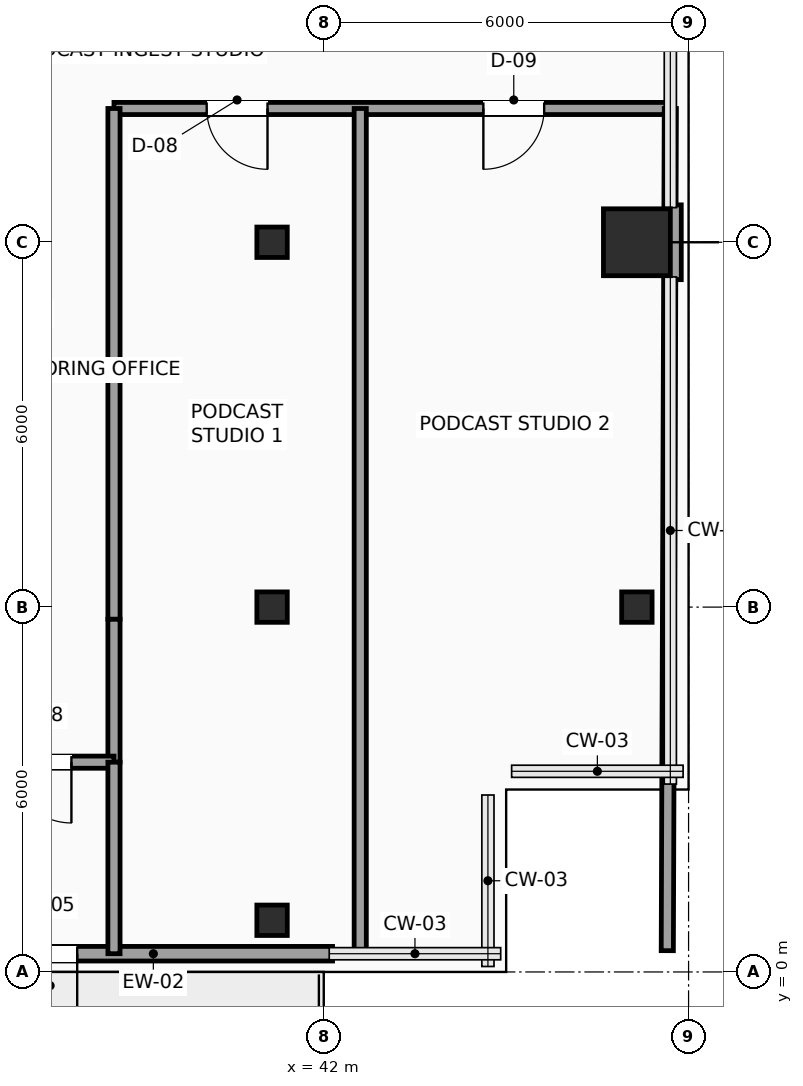
"""IFC4 building model, lengths in metres.
Left out: names, types, materials, properties, quantities, classifications, styles, units other than length and angle.
Written with IfcOpenShell. Run it as: python <this file> out.ifc"""

import sys

from ifc_helpers import new_model, si_unit, direction, frame, frame_2d, origin, origin_2d, place, context, subcontext, project, spatial, rectangle, hollow_rectangle, extrude, element, fill, save


model = new_model("IFC4")
c1 = context("Model", 3, precision=1e-05, world=origin(), true_north=direction((0.0, 1.0)))
c2 = subcontext(c1, "Body", "Model", "MODEL_VIEW")
j1 = project(units=[si_unit("LENGTHUNIT", "METRE"), si_unit("PLANEANGLEUNIT", "RADIAN")], contexts=[c1])
p1 = place(None, origin())
s1 = spatial("IfcSite", under=j1, at=p1, CompositionType="ELEMENT")
p2 = place(p1, origin())
s2 = spatial("IfcBuilding", under=s1, at=p2, CompositionType="ELEMENT")
p3 = place(p2, frame((0.0, 0.0, 123.15)))
s3 = spatial("IfcBuildingStorey", under=s2, at=p3, CompositionType="ELEMENT", Elevation=123.15)
for number, where, z_axis, x_axis in (
    (1, (41.15, 0.85, 0.0), (0.0, 0.0, 1.0), (1.0, 0.0, 0.0)),
    (2, (41.15, 6.0, 0.0), (0.0, 0.0, 1.0), (1.0, 0.0, 0.0)),
    (3, (41.15, 12.0, 0.0), (0.0, 0.0, 1.0), (1.0, 0.0, 0.0)),
    (4, (47.15, 6.0, 0.0), (0.0, 0.0, 1.0), (1.0, 0.0, 0.0)),
):
    element("IfcColumn", number, at=place(p3, frame(where, z_axis=z_axis, x_axis=x_axis)), inside=s3, PredefinedType="COLUMN", context=c2, shape_type="SweptSolid", body=[
        extrude(hollow_rectangle(XDim=0.5, YDim=0.5, WallThickness=0.025, InnerFilletRadius=0.025, OuterFilletRadius=0.04, at=origin_2d()), origin(), (0.0, 0.0, 1.0), 3.75),
    ])
p4 = place(p3, frame((47.15, 12.0, 0.0), z_axis=(0.0, 0.0, 1.0), x_axis=(1.0, 0.0, 0.0)))
e5 = element("IfcColumn", 5, at=p4, inside=s3, PredefinedType="COLUMN", context=c2, shape_type="SweptSolid", body=[
    extrude(rectangle(XDim=1.1, YDim=1.1, at=origin_2d()), origin(), (0.0, 0.0, 1.0), 3.75),
])
p5 = place(p3, frame((42.145, 0.3, 0.0), z_axis=(0.0, 0.0, 1.0), x_axis=(-1.0, 0.0, 0.0)))
e6 = element("IfcWall", 6, at=p5, inside=s3, PredefinedType="SOLIDWALL", context=c2, shape_type="SweptSolid", body=[
    extrude(rectangle(XDim=9.29, YDim=0.24, at=frame_2d((4.645, 0.0))), origin(), (0.0, 0.0, 1.0), 3.525),
])
p6 = place(p5, frame((4.2, 0.0, 0.0)))
e7 = element("IfcOpeningElement", 7, at=p6, cuts=e6, PredefinedType="OPENING", context=c2, shape_type="SweptSolid", body=[
    extrude(rectangle(XDim=1.05, YDim=2.2, at=frame_2d((0.525, 1.1))), frame((0.0, 0.13, 0.0), z_axis=(0.0, -1.0, 0.0), x_axis=(1.0, 0.0, 0.0)), (0.0, 0.0, 1.0), 0.26),
])
p7 = place(p3, frame((47.76, 12.615, 0.0), z_axis=(0.0, 0.0, 1.0), x_axis=(0.0, -1.0, 0.0)))
e8 = element("IfcWall", 8, at=p7, inside=s3, PredefinedType="SOLIDWALL", context=c2, shape_type="SweptSolid", body=[
    extrude(rectangle(XDim=1.23, YDim=0.24, at=frame_2d((0.615, 0.0))), origin(), (0.0, 0.0, 1.0), 3.525),
])
p8 = place(p3, frame((47.7, 14.2, 0.0), z_axis=(0.0, 0.0, 1.0), x_axis=(-1.0, 0.0, 0.0)))
e9 = element("IfcWall", 9, at=p8, inside=s3, PredefinedType="SOLIDWALL", context=c2, shape_type="SweptSolid", body=[
    extrude(rectangle(XDim=9.15, YDim=0.2, at=frame_2d((4.575, 0.0))), origin(), (0.0, 0.0, 1.0), 3.525),
])
p9 = place(p8, frame((6.625, 0.0, 0.0)))
e10 = element("IfcOpeningElement", 10, at=p9, cuts=e9, PredefinedType="OPENING", context=c2, shape_type="SweptSolid", body=[
    extrude(rectangle(XDim=1.0, YDim=2.2, at=frame_2d((0.5, 1.1))), frame((0.0, 0.11, 0.0), z_axis=(0.0, -1.0, 0.0), x_axis=(1.0, 0.0, 0.0)), (0.0, 0.0, 1.0), 0.22),
])
p10 = place(p8, frame((2.075, 0.0, 0.0)))
e11 = element("IfcOpeningElement", 11, at=p10, cuts=e9, PredefinedType="OPENING", context=c2, shape_type="SweptSolid", body=[
    extrude(rectangle(XDim=1.0, YDim=2.2, at=frame_2d((0.5, 1.1))), frame((0.0, 0.11, 0.0), z_axis=(0.0, -1.0, 0.0), x_axis=(1.0, 0.0, 0.0)), (0.0, 0.0, 1.0), 0.22),
])
p11 = place(p3, frame((38.55, 14.2, 0.0), z_axis=(0.0, 0.0, 1.0), x_axis=(0.0, -1.0, 0.0)))
e12 = element("IfcWall", 12, at=p11, inside=s3, PredefinedType="SOLIDWALL", context=c2, shape_type="SweptSolid", body=[
    extrude(rectangle(XDim=8.4, YDim=0.2, at=frame_2d((4.2, 0.0))), origin(), (0.0, 0.0, 1.0), 3.525),
])
p12 = place(p3, frame((38.55, 5.8, 0.0), z_axis=(0.0, 0.0, 1.0), x_axis=(0.0, -1.0, 0.0)))
e13 = element("IfcWall", 13, at=p12, inside=s3, PredefinedType="SOLIDWALL", context=c2, shape_type="SweptSolid", body=[
    extrude(rectangle(XDim=2.35, YDim=0.2, at=frame_2d((1.175, 0.0))), origin(), (0.0, 0.0, 1.0), 3.525),
])
p13 = place(p3, frame((38.55, 3.45, 0.0), z_axis=(0.0, 0.0, 1.0), x_axis=(-1.0, 0.0, 0.0)))
e14 = element("IfcWall", 14, at=p13, inside=s3, PredefinedType="SOLIDWALL", context=c2, shape_type="SweptSolid", body=[
    extrude(rectangle(XDim=2.4, YDim=0.2, at=frame_2d((1.2, 0.0))), origin(), (0.0, 0.0, 1.0), 3.067),
])
p14 = place(p13, frame((0.7, 0.0, 0.0)))
e15 = element("IfcOpeningElement", 15, at=p14, cuts=e14, PredefinedType="OPENING", context=c2, shape_type="SweptSolid", body=[
    extrude(rectangle(XDim=1.0, YDim=2.2, at=frame_2d((0.5, 1.1))), frame((0.0, 0.11, 0.0), z_axis=(0.0, -1.0, 0.0), x_axis=(1.0, 0.0, 0.0)), (0.0, 0.0, 1.0), 0.22),
])
p15 = place(p3, frame((38.55, 0.3, 0.0), z_axis=(0.0, 0.0, 1.0), x_axis=(0.0, 1.0, 0.0)))
e16 = element("IfcWall", 16, at=p15, inside=s3, PredefinedType="PARTITIONING", context=c2, shape_type="SweptSolid", body=[
    extrude(rectangle(XDim=3.15, YDim=0.2, at=frame_2d((1.575, 0.0))), origin(), (0.0, 0.0, 1.0), 3.525),
])
p16 = place(p3, frame((42.6, 0.3, 0.0), z_axis=(0.0, 0.0, 1.0), x_axis=(0.0, 1.0, 0.0)))
e17 = element("IfcWall", 17, at=p16, inside=s3, PredefinedType="PARTITIONING", context=c2, shape_type="SweptSolid", body=[
    extrude(rectangle(XDim=13.9, YDim=0.2, at=frame_2d((6.95, 0.0))), origin(), (0.0, 0.0, 1.0), 3.525),
])
p17 = place(p3, frame((47.65, 0.35, 0.0), z_axis=(0.0, 0.0, 1.0), x_axis=(0.003606251025, 0.999993497456, 0.0)))
e18 = element("IfcWall", 18, at=p17, inside=s3, PredefinedType="PARTITIONING", context=c2, shape_type="SweptSolid", body=[
    extrude(rectangle(XDim=11.035, YDim=0.2, at=frame_2d((5.518, 0.0))), origin(), (0.0, 0.0, 1.0), 3.525),
])
p18 = place(p3, frame((47.694, 12.615, 0.0), z_axis=(0.0, 0.0, 1.0), x_axis=(0.003542799701, 0.999993724265, 0.0)))
e19 = element("IfcWall", 19, at=p18, inside=s3, PredefinedType="PARTITIONING", context=c2, shape_type="SweptSolid", body=[
    extrude(rectangle(XDim=1.585, YDim=0.2, at=frame_2d((0.792, 0.0))), origin(), (0.0, 0.0, 1.0), 3.525),
])
p19 = place(p6, origin())
e20 = element("IfcDoor", 20, at=p19, inside=s3, OperationType="SINGLE_SWING_LEFT", PredefinedType="DOOR", context=c2, shape_type="SweptSolid", body=[
    extrude(rectangle(XDim=1.05, YDim=2.2, at=frame_2d((0.525, 1.1))), frame((0.0, 0.025, 0.0), z_axis=(0.0, -1.0, 0.0), x_axis=(1.0, 0.0, 0.0)), (0.0, 0.0, 1.0), 0.05),
])
fill(e7, e20)
p20 = place(p9, origin())
e21 = element("IfcDoor", 21, at=p20, inside=s3, OperationType="SINGLE_SWING_LEFT", PredefinedType="DOOR", context=c2, shape_type="SweptSolid", body=[
    extrude(rectangle(XDim=1.0, YDim=2.2, at=frame_2d((0.5, 1.1))), frame((0.0, 0.025, 0.0), z_axis=(0.0, -1.0, 0.0), x_axis=(1.0, 0.0, 0.0)), (0.0, 0.0, 1.0), 0.05),
])
fill(e10, e21)
p21 = place(p10, origin())
e22 = element("IfcDoor", 22, at=p21, inside=s3, OperationType="SINGLE_SWING_RIGHT", PredefinedType="DOOR", context=c2, shape_type="SweptSolid", body=[
    extrude(rectangle(XDim=1.0, YDim=2.2, at=frame_2d((0.5, 1.1))), frame((0.0, 0.025, 0.0), z_axis=(0.0, -1.0, 0.0), x_axis=(1.0, 0.0, 0.0)), (0.0, 0.0, 1.0), 0.05),
])
fill(e11, e22)
p22 = place(p14, origin())
e23 = element("IfcDoor", 23, at=p22, inside=s3, OperationType="SINGLE_SWING_LEFT", PredefinedType="DOOR", context=c2, shape_type="SweptSolid", body=[
    extrude(rectangle(XDim=1.0, YDim=2.2, at=frame_2d((0.5, 1.1))), frame((0.0, 0.025, 0.0), z_axis=(0.0, -1.0, 0.0), x_axis=(1.0, 0.0, 0.0)), (0.0, 0.0, 1.0), 0.05),
])
fill(e15, e23)
save(model, sys.argv[1])
